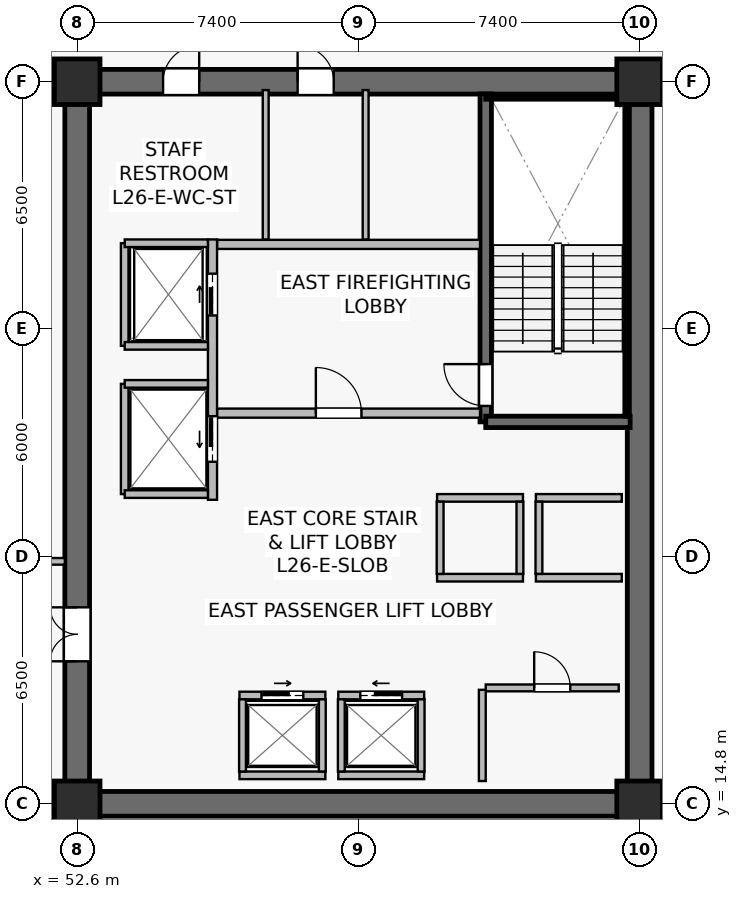
"""IFC4 building model, lengths in metres.
Left out: names, types, materials, properties, quantities, classifications, styles, units other than length and angle.
Written with IfcOpenShell. Run it as: python <this file> out.ifc"""

import sys

from ifc_helpers import new_model, si_unit, direction, frame, frame_2d, origin, origin_2d, place, context, subcontext, project, spatial, rectangle, extrude, source, transform, mapped, element, fill, save


model = new_model("IFC4")
c1 = context("Model", 3, precision=1e-05, world=origin(), true_north=direction((0.0, 1.0)))
c2 = subcontext(c1, "Body", "Model", "MODEL_VIEW")
j1 = project(units=[si_unit("LENGTHUNIT", "METRE"), si_unit("PLANEANGLEUNIT", "RADIAN")], contexts=[c1])
p1 = place(None, origin())
s1 = spatial("IfcSite", under=j1, at=p1, CompositionType="ELEMENT")
p2 = place(p1, origin())
s2 = spatial("IfcBuilding", under=s1, at=p2, CompositionType="ELEMENT")
p3 = place(p2, frame((0.0, 0.0, 109.2)))
s3 = spatial("IfcBuildingStorey", under=s2, at=p3, CompositionType="ELEMENT", Elevation=109.2)
p4 = place(p3, frame((52.275, 14.8, 0.0), z_axis=(0.0, 0.0, 1.0), x_axis=(1.0, 0.0, 0.0)))
e1 = element("IfcWall", 1, at=p4, inside=s3, PredefinedType="SHEAR", context=c2, shape_type="SweptSolid", body=[
    extrude(rectangle(XDim=15.45, YDim=0.65, at=frame_2d((7.725, 0.0))), origin(), (0.0, 0.0, 1.0), 3.79),
])
p5 = place(p3, frame((52.275, 33.8, 0.0), z_axis=(0.0, 0.0, 1.0), x_axis=(1.0, 0.0, 0.0)))
e2 = element("IfcWall", 2, at=p5, inside=s3, PredefinedType="SHEAR", context=c2, shape_type="SweptSolid", body=[
    extrude(rectangle(XDim=15.45, YDim=0.65, at=frame_2d((7.725, 0.0))), origin(), (0.0, 0.0, 1.0), 3.79),
])
p6 = place(p5, frame((6.125, 0.0, 0.0)))
e3 = element("IfcOpeningElement", 3, at=p6, cuts=e2, PredefinedType="OPENING", context=c2, shape_type="SweptSolid", body=[
    extrude(rectangle(XDim=0.95, YDim=2.15, at=frame_2d((0.475, 1.075))), frame((0.0, 0.335, 0.0), z_axis=(0.0, -1.0, 0.0), x_axis=(1.0, 0.0, 0.0)), (0.0, 0.0, 1.0), 0.67),
])
p7 = place(p5, frame((2.585, 0.0, 0.0)))
e4 = element("IfcOpeningElement", 4, at=p7, cuts=e2, PredefinedType="OPENING", context=c2, shape_type="SweptSolid", body=[
    extrude(rectangle(XDim=0.95, YDim=2.15, at=frame_2d((0.475, 1.075))), frame((0.0, 0.335, 0.0), z_axis=(0.0, -1.0, 0.0), x_axis=(1.0, 0.0, 0.0)), (0.0, 0.0, 1.0), 0.67),
])
p8 = place(p3, frame((52.6, 15.125, 0.0), z_axis=(0.0, 0.0, 1.0), x_axis=(0.0, 1.0, 0.0)))
e5 = element("IfcWall", 5, at=p8, inside=s3, PredefinedType="SHEAR", context=c2, shape_type="SweptSolid", body=[
    extrude(rectangle(XDim=18.35, YDim=0.65, at=frame_2d((9.175, 0.0))), origin(), (0.0, 0.0, 1.0), 3.79),
])
p9 = place(p8, frame((3.425, 0.0, 0.0)))
e6 = element("IfcOpeningElement", 6, at=p9, cuts=e5, PredefinedType="OPENING", context=c2, shape_type="SweptSolid", body=[
    extrude(rectangle(XDim=1.42, YDim=2.2, at=frame_2d((0.71, 1.1))), frame((0.0, 0.335, 0.0), z_axis=(0.0, -1.0, 0.0), x_axis=(1.0, 0.0, 0.0)), (0.0, 0.0, 1.0), 0.67),
])
p10 = place(p3, frame((67.4, 15.125, 0.0), z_axis=(0.0, 0.0, 1.0), x_axis=(0.0, 1.0, 0.0)))
e7 = element("IfcWall", 7, at=p10, inside=s3, PredefinedType="SHEAR", context=c2, shape_type="SweptSolid", body=[
    extrude(rectangle(XDim=18.35, YDim=0.65, at=frame_2d((9.175, 0.0))), origin(), (0.0, 0.0, 1.0), 3.79),
])
p11 = place(p3, frame((63.35, 24.85, 0.0), z_axis=(0.0, 0.0, 1.0), x_axis=(0.0, 1.0, 0.0)))
e8 = element("IfcWall", 8, at=p11, inside=s3, PredefinedType="SHEAR", context=c2, shape_type="SweptSolid", body=[
    extrude(rectangle(XDim=8.63, YDim=0.3, at=frame_2d((4.315, 0.0))), origin(), (0.0, 0.0, 1.0), 3.79),
])
p12 = place(p11, frame((0.42, 0.0, 0.0)))
e9 = element("IfcOpeningElement", 9, at=p12, cuts=e8, PredefinedType="OPENING", context=c2, shape_type="SweptSolid", body=[
    extrude(rectangle(XDim=1.1, YDim=2.15, at=frame_2d((0.55, 1.075))), frame((0.0, 0.16, 0.0), z_axis=(0.0, -1.0, 0.0), x_axis=(1.0, 0.0, 0.0)), (0.0, 0.0, 1.0), 0.32),
])
p13 = place(p3, frame((63.35, 24.85, 0.0), z_axis=(0.0, 0.0, 1.0), x_axis=(1.0, 0.0, 0.0)))
e10 = element("IfcWall", 10, at=p13, inside=s3, PredefinedType="SHEAR", context=c2, shape_type="SweptSolid", body=[
    extrude(rectangle(XDim=3.8, YDim=0.3, at=frame_2d((1.9, 0.0))), origin(), (0.0, 0.0, 1.0), 3.79),
])
p14 = place(p3, frame((63.35, 33.4, 0.0), z_axis=(0.0, 0.0, 1.0), x_axis=(1.0, 0.0, 0.0)))
e11 = element("IfcWall", 11, at=p14, inside=s3, PredefinedType="SOLIDWALL", context=c2, shape_type="SweptSolid", body=[
    extrude(rectangle(XDim=3.72, YDim=0.12, at=frame_2d((1.86, 0.0))), origin(), (0.0, 0.0, 1.0), 3.79),
])
p15 = place(p3, frame((67.07, 25.0, 0.0), z_axis=(0.0, 0.0, 1.0), x_axis=(0.0, 1.0, 0.0)))
e12 = element("IfcWall", 12, at=p15, inside=s3, PredefinedType="SOLIDWALL", context=c2, shape_type="SweptSolid", body=[
    extrude(rectangle(XDim=8.32, YDim=0.12, at=frame_2d((4.16, 0.0))), origin(), (0.0, 0.0, 1.0), 3.79),
])
m1 = source(origin(), c2, "Body", "SweptSolid", [
    extrude(rectangle(XDim=1.2, YDim=1.2, at=origin_2d()), origin(), (0.0, 0.0, 1.0), 4.1),
])
for number, where, z_axis, x_axis in (
    (13, (52.6, 14.8, 0.0), (0.0, 0.0, 1.0), (1.0, 0.0, 0.0)),
    (14, (67.4, 14.8, 0.0), (0.0, 0.0, 1.0), (1.0, 0.0, 0.0)),
    (15, (52.6, 33.8, 0.0), (0.0, 0.0, 1.0), (1.0, 0.0, 0.0)),
    (16, (67.4, 33.8, 0.0), (0.0, 0.0, 1.0), (1.0, 0.0, 0.0)),
):
    element("IfcColumn", number, at=place(p3, frame(where, z_axis=z_axis, x_axis=x_axis)), inside=s3, PredefinedType="COLUMN", context=c2, shape_type="MappedRepresentation", body=[
        mapped(m1, transform((0.0, 0.0, 0.0), scale=1.0)),
    ])
p16 = place(p3, frame((56.28, 25.08, 0.0), z_axis=(0.0, 0.0, 1.0), x_axis=(1.0, 0.0, 0.0)))
e17 = element("IfcWall", 17, at=p16, inside=s3, PredefinedType="SOLIDWALL", context=c2, shape_type="SweptSolid", body=[
    extrude(rectangle(XDim=6.92, YDim=0.24, at=frame_2d((3.46, 0.0))), origin(), (0.0, 0.0, 1.0), 3.125),
])
p17 = place(p16, frame((2.6, 0.0, 0.0)))
e18 = element("IfcOpeningElement", 18, at=p17, cuts=e17, PredefinedType="OPENING", context=c2, shape_type="SweptSolid", body=[
    extrude(rectangle(XDim=1.2, YDim=2.16, at=frame_2d((0.6, 1.08))), frame((0.0, 0.13, 0.0), z_axis=(0.0, -1.0, 0.0), x_axis=(1.0, 0.0, 0.0)), (0.0, 0.0, 1.0), 0.26),
])
p18 = place(p3, frame((56.28, 29.52, 0.0), z_axis=(0.0, 0.0, 1.0), x_axis=(1.0, 0.0, 0.0)))
e19 = element("IfcWall", 19, at=p18, inside=s3, PredefinedType="SOLIDWALL", context=c2, shape_type="SweptSolid", body=[
    extrude(rectangle(XDim=6.92, YDim=0.24, at=frame_2d((3.46, 0.0))), origin(), (0.0, 0.0, 1.0), 3.125),
])
p19 = place(p3, frame((56.16, 22.8, 0.0), z_axis=(0.0, 0.0, 1.0), x_axis=(0.0, 1.0, 0.0)))
e20 = element("IfcWall", 20, at=p19, inside=s3, PredefinedType="SOLIDWALL", context=c2, shape_type="SweptSolid", body=[
    extrude(rectangle(XDim=6.85, YDim=0.24, at=frame_2d((3.425, 0.0))), origin(), (0.0, 0.0, 1.0), 2.875),
])
p20 = place(p19, frame((4.85, 0.0, 0.0)))
e21 = element("IfcOpeningElement", 21, at=p20, cuts=e20, PredefinedType="OPENING", context=c2, shape_type="SweptSolid", body=[
    extrude(rectangle(XDim=1.1, YDim=2.22, at=frame_2d((0.55, 1.11))), frame((0.0, 0.13, 0.0), z_axis=(0.0, -1.0, 0.0), x_axis=(1.0, 0.0, 0.0)), (0.0, 0.0, 1.0), 0.26),
])
p21 = place(p19, frame((1.0, 0.0, 0.0)))
e22 = element("IfcOpeningElement", 22, at=p21, cuts=e20, PredefinedType="OPENING", context=c2, shape_type="SweptSolid", body=[
    extrude(rectangle(XDim=1.2, YDim=2.22, at=frame_2d((0.6, 1.11))), frame((0.0, 0.13, 0.0), z_axis=(0.0, -1.0, 0.0), x_axis=(1.0, 0.0, 0.0)), (0.0, 0.0, 1.0), 0.26),
])
p22 = place(p3, frame((59.47, 17.65, 0.0), z_axis=(0.0, 0.0, 1.0), x_axis=(1.0, 0.0, 0.0)))
e23 = element("IfcWall", 23, at=p22, inside=s3, PredefinedType="SOLIDWALL", context=c2, shape_type="SweptSolid", body=[
    extrude(rectangle(XDim=2.26, YDim=0.2, at=frame_2d((1.13, 0.0))), origin(), (0.0, 0.0, 1.0), 3.125),
])
p23 = place(p22, frame((0.58, 0.0, 0.0)))
e24 = element("IfcOpeningElement", 24, at=p23, cuts=e23, PredefinedType="OPENING", context=c2, shape_type="SweptSolid", body=[
    extrude(rectangle(XDim=1.1, YDim=2.22, at=frame_2d((0.55, 1.11))), frame((0.0, 0.11, 0.0), z_axis=(0.0, -1.0, 0.0), x_axis=(1.0, 0.0, 0.0)), (0.0, 0.0, 1.0), 0.22),
])
p24 = place(p3, frame((59.47, 15.55, 0.0), z_axis=(0.0, 0.0, 1.0), x_axis=(1.0, 0.0, 0.0)))
e25 = element("IfcWall", 25, at=p24, inside=s3, PredefinedType="SOLIDWALL", context=c2, shape_type="SweptSolid", body=[
    extrude(rectangle(XDim=2.26, YDim=0.2, at=frame_2d((1.13, 0.0))), origin(), (0.0, 0.0, 1.0), 3.125),
])
for number, where, z_axis, x_axis in (
    (26, (59.55, 15.65, 0.0), (0.0, 0.0, 1.0), (0.0, 1.0, 0.0)),
    (27, (61.65, 15.65, 0.0), (0.0, 0.0, 1.0), (0.0, 1.0, 0.0)),
):
    element("IfcWall", number, at=place(p3, frame(where, z_axis=z_axis, x_axis=x_axis)), inside=s3, PredefinedType="SOLIDWALL", context=c2, shape_type="SweptSolid", body=[
        extrude(rectangle(XDim=1.9, YDim=0.18, at=frame_2d((0.95, 0.0))), origin(), (0.0, 0.0, 1.0), 3.79),
    ])
p25 = place(p3, frame((56.87, 17.65, 0.0), z_axis=(0.0, 0.0, 1.0), x_axis=(1.0, 0.0, 0.0)))
e28 = element("IfcWall", 28, at=p25, inside=s3, PredefinedType="SOLIDWALL", context=c2, shape_type="SweptSolid", body=[
    extrude(rectangle(XDim=2.26, YDim=0.2, at=frame_2d((1.13, 0.0))), origin(), (0.0, 0.0, 1.0), 3.79),
])
p26 = place(p25, frame((0.58, 0.0, 0.0)))
e29 = element("IfcOpeningElement", 29, at=p26, cuts=e28, PredefinedType="OPENING", context=c2, shape_type="SweptSolid", body=[
    extrude(rectangle(XDim=1.1, YDim=2.22, at=frame_2d((0.55, 1.11))), frame((0.0, 0.11, 0.0), z_axis=(0.0, -1.0, 0.0), x_axis=(1.0, 0.0, 0.0)), (0.0, 0.0, 1.0), 0.22),
])
p27 = place(p3, frame((56.87, 15.55, 0.0), z_axis=(0.0, 0.0, 1.0), x_axis=(1.0, 0.0, 0.0)))
e30 = element("IfcWall", 30, at=p27, inside=s3, PredefinedType="SOLIDWALL", context=c2, shape_type="SweptSolid", body=[
    extrude(rectangle(XDim=2.26, YDim=0.2, at=frame_2d((1.13, 0.0))), origin(), (0.0, 0.0, 1.0), 3.79),
])
for number, where, z_axis, x_axis in (
    (31, (56.95, 15.65, 0.0), (0.0, 0.0, 1.0), (0.0, 1.0, 0.0)),
    (32, (59.05, 15.65, 0.0), (0.0, 0.0, 1.0), (0.0, 1.0, 0.0)),
):
    element("IfcWall", number, at=place(p3, frame(where, z_axis=z_axis, x_axis=x_axis)), inside=s3, PredefinedType="SOLIDWALL", context=c2, shape_type="SweptSolid", body=[
        extrude(rectangle(XDim=1.9, YDim=0.18, at=frame_2d((0.95, 0.0))), origin(), (0.0, 0.0, 1.0), 3.79),
    ])
for number, where, z_axis, x_axis in (
    (33, (64.67, 20.75, 0.0), (0.0, 0.0, 1.0), (1.0, 0.0, 0.0)),
    (34, (64.67, 22.85, 0.0), (0.0, 0.0, 1.0), (1.0, 0.0, 0.0)),
):
    element("IfcWall", number, at=place(p3, frame(where, z_axis=z_axis, x_axis=x_axis)), inside=s3, PredefinedType="SOLIDWALL", context=c2, shape_type="SweptSolid", body=[
        extrude(rectangle(XDim=2.26, YDim=0.2, at=frame_2d((1.13, 0.0))), origin(), (0.0, 0.0, 1.0), 3.79),
    ])
p28 = place(p3, frame((64.75, 20.85, 0.0), z_axis=(0.0, 0.0, 1.0), x_axis=(0.0, 1.0, 0.0)))
e35 = element("IfcWall", 35, at=p28, inside=s3, PredefinedType="SOLIDWALL", context=c2, shape_type="SweptSolid", body=[
    extrude(rectangle(XDim=1.9, YDim=0.18, at=frame_2d((0.95, 0.0))), origin(), (0.0, 0.0, 1.0), 3.79),
])
for number, where, z_axis, x_axis in (
    (36, (62.07, 20.75, 0.0), (0.0, 0.0, 1.0), (1.0, 0.0, 0.0)),
    (37, (62.07, 22.85, 0.0), (0.0, 0.0, 1.0), (1.0, 0.0, 0.0)),
):
    element("IfcWall", number, at=place(p3, frame(where, z_axis=z_axis, x_axis=x_axis)), inside=s3, PredefinedType="SOLIDWALL", context=c2, shape_type="SweptSolid", body=[
        extrude(rectangle(XDim=2.26, YDim=0.2, at=frame_2d((1.13, 0.0))), origin(), (0.0, 0.0, 1.0), 3.79),
    ])
for number, where, z_axis, x_axis in (
    (38, (62.15, 20.85, 0.0), (0.0, 0.0, 1.0), (0.0, 1.0, 0.0)),
    (39, (64.25, 20.85, 0.0), (0.0, 0.0, 1.0), (0.0, 1.0, 0.0)),
):
    element("IfcWall", number, at=place(p3, frame(where, z_axis=z_axis, x_axis=x_axis)), inside=s3, PredefinedType="SOLIDWALL", context=c2, shape_type="SweptSolid", body=[
        extrude(rectangle(XDim=1.9, YDim=0.18, at=frame_2d((0.95, 0.0))), origin(), (0.0, 0.0, 1.0), 3.79),
    ])
p29 = place(p3, frame((53.85, 26.85, 0.0), z_axis=(0.0, 0.0, 1.0), x_axis=(0.0, 1.0, 0.0)))
e40 = element("IfcWall", 40, at=p29, inside=s3, PredefinedType="SOLIDWALL", context=c2, shape_type="SweptSolid", body=[
    extrude(rectangle(XDim=2.7, YDim=0.2, at=frame_2d((1.35, 0.0))), origin(), (0.0, 0.0, 1.0), 3.79),
])
p30 = place(p3, frame((53.85, 29.55, 0.0), z_axis=(0.0, 0.0, 1.0), x_axis=(1.0, 0.0, 0.0)))
e41 = element("IfcWall", 41, at=p30, inside=s3, PredefinedType="SOLIDWALL", context=c2, shape_type="SweptSolid", body=[
    extrude(rectangle(XDim=2.19, YDim=0.2, at=frame_2d((1.095, 0.0))), origin(), (0.0, 0.0, 1.0), 3.79),
])
p31 = place(p3, frame((53.85, 26.85, 0.0), z_axis=(0.0, 0.0, 1.0), x_axis=(1.0, 0.0, 0.0)))
e42 = element("IfcWall", 42, at=p31, inside=s3, PredefinedType="SOLIDWALL", context=c2, shape_type="SweptSolid", body=[
    extrude(rectangle(XDim=2.19, YDim=0.2, at=frame_2d((1.095, 0.0))), origin(), (0.0, 0.0, 1.0), 3.187),
])
p32 = place(p3, frame((53.85, 22.95, 0.0), z_axis=(0.0, 0.0, 1.0), x_axis=(0.0, 1.0, 0.0)))
e43 = element("IfcWall", 43, at=p32, inside=s3, PredefinedType="SOLIDWALL", context=c2, shape_type="SweptSolid", body=[
    extrude(rectangle(XDim=2.9, YDim=0.2, at=frame_2d((1.45, 0.0))), origin(), (0.0, 0.0, 1.0), 2.875),
])
for number, where, z_axis, x_axis in (
    (44, (53.85, 25.85, 0.0), (0.0, 0.0, 1.0), (1.0, 0.0, 0.0)),
    (45, (53.85, 22.95, 0.0), (0.0, 0.0, 1.0), (1.0, 0.0, 0.0)),
):
    element("IfcWall", number, at=place(p3, frame(where, z_axis=z_axis, x_axis=x_axis)), inside=s3, PredefinedType="SOLIDWALL", context=c2, shape_type="SweptSolid", body=[
        extrude(rectangle(XDim=2.19, YDim=0.2, at=frame_2d((1.095, 0.0))), origin(), (0.0, 0.0, 1.0), 3.79),
    ])
p33 = place(p3, frame((63.35, 17.85, 0.0), z_axis=(0.0, 0.0, 1.0), x_axis=(1.0, 0.0, 0.0)))
e46 = element("IfcWall", 46, at=p33, inside=s3, PredefinedType="SOLIDWALL", context=c2, shape_type="SweptSolid", body=[
    extrude(rectangle(XDim=3.5, YDim=0.18, at=frame_2d((1.75, 0.0))), origin(), (0.0, 0.0, 1.0), 3.79),
])
p34 = place(p33, frame((1.275, 0.0, 0.0)))
e47 = element("IfcOpeningElement", 47, at=p34, cuts=e46, PredefinedType="OPENING", context=c2, shape_type="SweptSolid", body=[
    extrude(rectangle(XDim=0.95, YDim=2.15, at=frame_2d((0.475, 1.075))), frame((0.0, 0.1, 0.0), z_axis=(0.0, -1.0, 0.0), x_axis=(1.0, 0.0, 0.0)), (0.0, 0.0, 1.0), 0.2),
])
p35 = place(p3, frame((63.26, 15.4, 0.0), z_axis=(0.0, 0.0, 1.0), x_axis=(0.0, 1.0, 0.0)))
e48 = element("IfcWall", 48, at=p35, inside=s3, PredefinedType="SOLIDWALL", context=c2, shape_type="SweptSolid", body=[
    extrude(rectangle(XDim=2.4, YDim=0.18, at=frame_2d((1.2, 0.0))), origin(), (0.0, 0.0, 1.0), 3.79),
])
p36 = place(p3, frame((60.19, 29.65, 0.0), z_axis=(0.0, 0.0, 1.0), x_axis=(0.0, 1.0, 0.0)))
e49 = element("IfcWall", 49, at=p36, inside=s3, PredefinedType="PLUMBINGWALL", context=c2, shape_type="SweptSolid", body=[
    extrude(rectangle(XDim=3.93, YDim=0.155, at=frame_2d((1.965, 0.0))), origin(), (0.0, 0.0, 1.0), 3.125),
])
p37 = place(p3, frame((57.56, 29.65, 0.0), z_axis=(0.0, 0.0, 1.0), x_axis=(0.0, 1.0, 0.0)))
e50 = element("IfcWall", 50, at=p37, inside=s3, PredefinedType="PLUMBINGWALL", context=c2, shape_type="SweptSolid", body=[
    extrude(rectangle(XDim=3.93, YDim=0.155, at=frame_2d((1.965, 0.0))), origin(), (0.0, 0.0, 1.0), 3.79),
])
p38 = place(p3, frame((48.3, 34.26, 0.0), z_axis=(0.0, 0.0, 1.0), x_axis=(1.0, 0.0, 0.0)))
e51 = element("IfcWall", 51, at=p38, inside=s3, PredefinedType="PARTITIONING", context=c2, shape_type="SweptSolid", body=[
    extrude(rectangle(XDim=3.975, YDim=0.175, at=frame_2d((1.987, 0.0))), origin(), (0.0, 0.0, 1.0), 3.475),
])
p39 = place(p3, frame((48.3, 21.18, 0.0), z_axis=(0.0, 0.0, 1.0), x_axis=(1.0, 0.0, 0.0)))
e52 = element("IfcWall", 52, at=p39, inside=s3, PredefinedType="PARTITIONING", context=c2, shape_type="SweptSolid", body=[
    extrude(rectangle(XDim=3.975, YDim=0.175, at=frame_2d((1.987, 0.0))), origin(), (0.0, 0.0, 1.0), 3.79),
])
p40 = place(p39, frame((1.35, 0.0, 0.0)))
e53 = element("IfcOpeningElement", 53, at=p40, cuts=e52, PredefinedType="OPENING", context=c2, shape_type="SweptSolid", body=[
    extrude(rectangle(XDim=0.95, YDim=2.15, at=frame_2d((0.475, 1.075))), frame((0.0, 0.098, 0.0), z_axis=(0.0, -1.0, 0.0), x_axis=(1.0, 0.0, 0.0)), (0.0, 0.0, 1.0), 0.195),
])
m2 = source(origin(), c2, "Body", "SweptSolid", [
    extrude(rectangle(XDim=1.1, YDim=2.15, at=frame_2d((0.55, 1.075))), frame((0.0, 0.025, 0.0), z_axis=(0.0, -1.0, 0.0), x_axis=(1.0, 0.0, 0.0)), (0.0, 0.0, 1.0), 0.05),
])
p41 = place(p12, origin())
e54 = element("IfcDoor", 54, at=p41, inside=s3, OperationType="SINGLE_SWING_RIGHT", PredefinedType="DOOR", context=c2, shape_type="MappedRepresentation", body=[
    mapped(m2, transform((0.0, 0.0, 0.0), scale=1.0)),
])
fill(e9, e54)
m3 = source(origin(), c2, "Body", "SweptSolid", [
    extrude(rectangle(XDim=1.2, YDim=2.16, at=frame_2d((0.6, 1.08))), frame((0.0, 0.025, 0.0), z_axis=(0.0, -1.0, 0.0), x_axis=(1.0, 0.0, 0.0)), (0.0, 0.0, 1.0), 0.05),
])
p42 = place(p17, origin())
e55 = element("IfcDoor", 55, at=p42, inside=s3, OperationType="SINGLE_SWING_LEFT", PredefinedType="DOOR", context=c2, shape_type="MappedRepresentation", body=[
    mapped(m3, transform((0.0, 0.0, 0.0), scale=1.0)),
])
fill(e18, e55)
m4 = source(origin(), c2, "Body", "SweptSolid", [
    extrude(rectangle(XDim=1.1, YDim=2.22, at=frame_2d((0.55, 1.11))), frame((0.0, 0.025, 0.0), z_axis=(0.0, -1.0, 0.0), x_axis=(1.0, 0.0, 0.0)), (0.0, 0.0, 1.0), 0.05),
])
p43 = place(p23, origin())
e56 = element("IfcDoor", 56, at=p43, inside=s3, OperationType="SLIDING_TO_LEFT", PredefinedType="USERDEFINED", context=c2, shape_type="MappedRepresentation", body=[
    mapped(m4, transform((0.0, 0.0, 0.0), scale=1.0)),
])
fill(e24, e56)
p44 = place(p26, origin())
e57 = element("IfcDoor", 57, at=p44, inside=s3, OperationType="SLIDING_TO_RIGHT", PredefinedType="USERDEFINED", context=c2, shape_type="MappedRepresentation", body=[
    mapped(m4, transform((0.0, 0.0, 0.0), scale=1.0)),
])
fill(e29, e57)
p45 = place(p20, origin())
e58 = element("IfcDoor", 58, at=p45, inside=s3, OperationType="SLIDING_TO_RIGHT", PredefinedType="USERDEFINED", context=c2, shape_type="MappedRepresentation", body=[
    mapped(m4, transform((0.0, 0.0, 0.0), scale=1.0)),
])
fill(e21, e58)
m5 = source(origin(), c2, "Body", "SweptSolid", [
    extrude(rectangle(XDim=1.2, YDim=2.22, at=frame_2d((0.6, 1.11))), frame((0.0, 0.025, 0.0), z_axis=(0.0, -1.0, 0.0), x_axis=(1.0, 0.0, 0.0)), (0.0, 0.0, 1.0), 0.05),
])
p46 = place(p21, origin())
e59 = element("IfcDoor", 59, at=p46, inside=s3, OperationType="SLIDING_TO_LEFT", PredefinedType="USERDEFINED", context=c2, shape_type="MappedRepresentation", body=[
    mapped(m5, transform((0.0, 0.0, 0.0), scale=1.0)),
])
fill(e22, e59)
m6 = source(origin(), c2, "Body", "SweptSolid", [
    extrude(rectangle(XDim=0.95, YDim=2.15, at=frame_2d((0.475, 1.075))), frame((0.0, 0.025, 0.0), z_axis=(0.0, -1.0, 0.0), x_axis=(1.0, 0.0, 0.0)), (0.0, 0.0, 1.0), 0.05),
])
p47 = place(p34, origin())
e60 = element("IfcDoor", 60, at=p47, inside=s3, OperationType="SINGLE_SWING_LEFT", PredefinedType="DOOR", context=c2, shape_type="MappedRepresentation", body=[
    mapped(m6, transform((0.0, 0.0, 0.0), scale=1.0)),
])
fill(e47, e60)
m7 = source(origin(), c2, "Body", "SweptSolid", [
    extrude(rectangle(XDim=1.42, YDim=2.2, at=frame_2d((0.71, 1.1))), frame((0.0, 0.025, 0.0), z_axis=(0.0, -1.0, 0.0), x_axis=(1.0, 0.0, 0.0)), (0.0, 0.0, 1.0), 0.05),
])
p48 = place(p9, origin())
e61 = element("IfcDoor", 61, at=p48, inside=s3, OperationType="DOUBLE_DOOR_SINGLE_SWING", PredefinedType="DOOR", context=c2, shape_type="MappedRepresentation", body=[
    mapped(m7, transform((0.0, 0.0, 0.0), scale=1.0)),
])
fill(e6, e61)
p49 = place(p6, origin())
e62 = element("IfcDoor", 62, at=p49, inside=s3, OperationType="SINGLE_SWING_LEFT", PredefinedType="DOOR", context=c2, shape_type="MappedRepresentation", body=[
    mapped(m6, transform((0.0, 0.0, 0.0), scale=1.0)),
])
fill(e3, e62)
p50 = place(p7, origin())
e63 = element("IfcDoor", 63, at=p50, inside=s3, OperationType="SINGLE_SWING_RIGHT", PredefinedType="DOOR", context=c2, shape_type="MappedRepresentation", body=[
    mapped(m6, transform((0.0, 0.0, 0.0), scale=1.0)),
])
fill(e4, e63)
save(model, sys.argv[1])
